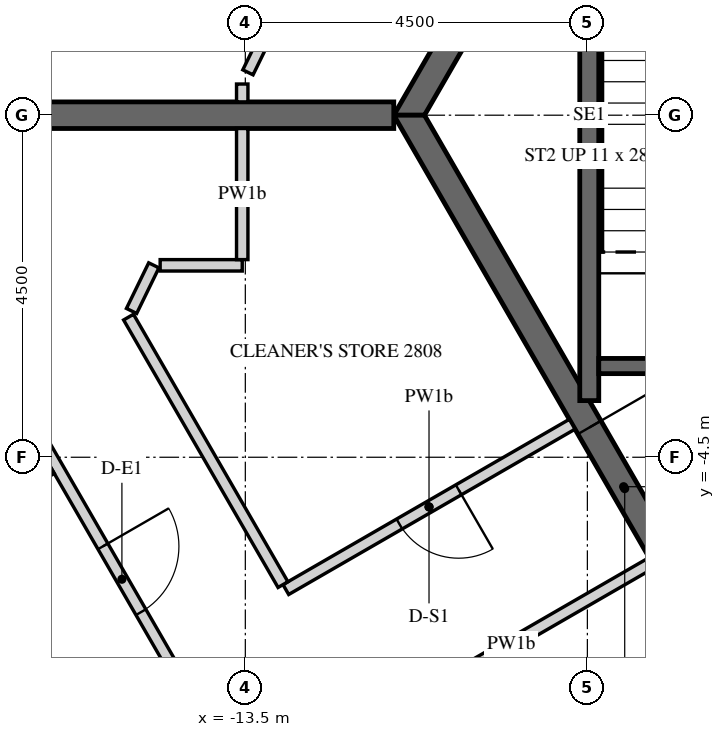
"""IFC4 building model, lengths in metres.
Left out: names, types, materials, properties, quantities, classifications, styles, units other than length and angle.
Written with IfcOpenShell. Run it as: python <this file> out.ifc"""

import sys

from ifc_helpers import new_model, si_unit, direction, frame, frame_2d, origin, place, context, subcontext, project, spatial, polyline, rectangle, outline, extrude, element, fill, save


model = new_model("IFC4")
c1 = context("Model", 3, precision=1e-05, world=origin(), true_north=direction((0.0, 1.0)))
c2 = subcontext(c1, "Body", "Model", "MODEL_VIEW")
j1 = project(units=[si_unit("LENGTHUNIT", "METRE"), si_unit("PLANEANGLEUNIT", "RADIAN")], contexts=[c1])
p1 = place(None, origin())
s1 = spatial("IfcSite", under=j1, at=p1, CompositionType="ELEMENT")
p2 = place(p1, origin())
s2 = spatial("IfcBuilding", under=s1, at=p2, CompositionType="ELEMENT")
p3 = place(p2, frame((0.0, 0.0, 361.2)))
s3 = spatial("IfcBuildingStorey", under=s2, at=p3, CompositionType="ELEMENT", Elevation=361.2)
p4 = place(p3, frame((-14.619, 19.699, -0.15), z_axis=(0.0, 0.0, 1.0), x_axis=(-0.438373747484, -0.898792777851, 0.0)))
e1 = element("IfcWall", 1, at=p4, inside=s3, PredefinedType="SOLIDWALL", context=c2, shape_type="SweptSolid", body=[
    extrude(outline(polyline([(0.225, -0.225), (20.506, -0.225), (20.957, 0.225), (-0.225, 0.225), (0.225, -0.225)])), origin(), (0.0, 0.0, 1.0), 3.9),
])
p5 = place(p4, frame((0.325, 0.0, 1.05)))
e2 = element("IfcOpeningElement", 2, at=p5, cuts=e1, PredefinedType="OPENING", context=c2, shape_type="SweptSolid", body=[
    extrude(rectangle(XDim=0.9, YDim=1.5, at=frame_2d((0.45, 0.75))), frame((0.0, 0.235, 0.0), z_axis=(0.0, -1.0, 0.0), x_axis=(1.0, 0.0, 0.0)), (0.0, 0.0, 1.0), 0.47),
])
p6 = place(p4, frame((1.525, 0.0, 0.15)))
e3 = element("IfcOpeningElement", 3, at=p6, cuts=e1, PredefinedType="OPENING", context=c2, shape_type="SweptSolid", body=[
    extrude(rectangle(XDim=1.2, YDim=2.4, at=frame_2d((0.6, 1.2))), frame((0.0, 0.235, 0.0), z_axis=(0.0, -1.0, 0.0), x_axis=(1.0, 0.0, 0.0)), (0.0, 0.0, 1.0), 0.47),
])
p7 = place(p4, frame((3.766, 0.0, 1.05)))
e4 = element("IfcOpeningElement", 4, at=p7, cuts=e1, PredefinedType="OPENING", context=c2, shape_type="SweptSolid", body=[
    extrude(rectangle(XDim=0.9, YDim=1.5, at=frame_2d((0.45, 0.75))), frame((0.0, 0.235, 0.0), z_axis=(0.0, -1.0, 0.0), x_axis=(1.0, 0.0, 0.0)), (0.0, 0.0, 1.0), 0.47),
])
p8 = place(p4, frame((4.966, 0.0, 0.15)))
e5 = element("IfcOpeningElement", 5, at=p8, cuts=e1, PredefinedType="OPENING", context=c2, shape_type="SweptSolid", body=[
    extrude(rectangle(XDim=1.2, YDim=2.4, at=frame_2d((0.6, 1.2))), frame((0.0, 0.235, 0.0), z_axis=(0.0, -1.0, 0.0), x_axis=(1.0, 0.0, 0.0)), (0.0, 0.0, 1.0), 0.47),
])
p9 = place(p4, frame((7.366, 0.0, 1.05)))
e6 = element("IfcOpeningElement", 6, at=p9, cuts=e1, PredefinedType="OPENING", context=c2, shape_type="SweptSolid", body=[
    extrude(rectangle(XDim=0.9, YDim=1.5, at=frame_2d((0.45, 0.75))), frame((0.0, 0.235, 0.0), z_axis=(0.0, -1.0, 0.0), x_axis=(1.0, 0.0, 0.0)), (0.0, 0.0, 1.0), 0.47),
])
p10 = place(p4, frame((8.566, 0.0, 0.15)))
e7 = element("IfcOpeningElement", 7, at=p10, cuts=e1, PredefinedType="OPENING", context=c2, shape_type="SweptSolid", body=[
    extrude(rectangle(XDim=1.2, YDim=2.4, at=frame_2d((0.6, 1.2))), frame((0.0, 0.235, 0.0), z_axis=(0.0, -1.0, 0.0), x_axis=(1.0, 0.0, 0.0)), (0.0, 0.0, 1.0), 0.47),
])
p11 = place(p4, frame((10.966, 0.0, 1.05)))
e8 = element("IfcOpeningElement", 8, at=p11, cuts=e1, PredefinedType="OPENING", context=c2, shape_type="SweptSolid", body=[
    extrude(rectangle(XDim=0.9, YDim=1.5, at=frame_2d((0.45, 0.75))), frame((0.0, 0.235, 0.0), z_axis=(0.0, -1.0, 0.0), x_axis=(1.0, 0.0, 0.0)), (0.0, 0.0, 1.0), 0.47),
])
p12 = place(p4, frame((12.166, 0.0, 0.15)))
e9 = element("IfcOpeningElement", 9, at=p12, cuts=e1, PredefinedType="OPENING", context=c2, shape_type="SweptSolid", body=[
    extrude(rectangle(XDim=1.2, YDim=2.4, at=frame_2d((0.6, 1.2))), frame((0.0, 0.235, 0.0), z_axis=(0.0, -1.0, 0.0), x_axis=(1.0, 0.0, 0.0)), (0.0, 0.0, 1.0), 0.47),
])
p13 = place(p4, frame((14.566, 0.0, 1.05)))
e10 = element("IfcOpeningElement", 10, at=p13, cuts=e1, PredefinedType="OPENING", context=c2, shape_type="SweptSolid", body=[
    extrude(rectangle(XDim=0.9, YDim=1.5, at=frame_2d((0.45, 0.75))), frame((0.0, 0.235, 0.0), z_axis=(0.0, -1.0, 0.0), x_axis=(1.0, 0.0, 0.0)), (0.0, 0.0, 1.0), 0.47),
])
p14 = place(p4, frame((15.766, 0.0, 0.15)))
e11 = element("IfcOpeningElement", 11, at=p14, cuts=e1, PredefinedType="OPENING", context=c2, shape_type="SweptSolid", body=[
    extrude(rectangle(XDim=1.2, YDim=2.4, at=frame_2d((0.6, 1.2))), frame((0.0, 0.235, 0.0), z_axis=(0.0, -1.0, 0.0), x_axis=(1.0, 0.0, 0.0)), (0.0, 0.0, 1.0), 0.47),
])
p15 = place(p4, frame((18.007, 0.0, 1.05)))
e12 = element("IfcOpeningElement", 12, at=p15, cuts=e1, PredefinedType="OPENING", context=c2, shape_type="SweptSolid", body=[
    extrude(rectangle(XDim=0.9, YDim=1.5, at=frame_2d((0.45, 0.75))), frame((0.0, 0.235, 0.0), z_axis=(0.0, -1.0, 0.0), x_axis=(1.0, 0.0, 0.0)), (0.0, 0.0, 1.0), 0.47),
])
p16 = place(p4, frame((19.207, 0.0, 0.15)))
e13 = element("IfcOpeningElement", 13, at=p16, cuts=e1, PredefinedType="OPENING", context=c2, shape_type="SweptSolid", body=[
    extrude(rectangle(XDim=1.2, YDim=2.4, at=frame_2d((0.6, 1.2))), frame((0.0, 0.235, 0.0), z_axis=(0.0, -1.0, 0.0), x_axis=(1.0, 0.0, 0.0)), (0.0, 0.0, 1.0), 0.47),
])
p17 = place(p3, frame((-25.907, -2.678, -0.15), z_axis=(0.0, 0.0, 1.0), x_axis=(0.499997453958, -0.866026873738, 0.0)))
e14 = element("IfcWall", 14, at=p17, inside=s3, PredefinedType="SOLIDWALL", context=c2, shape_type="SweptSolid", body=[
    extrude(outline(polyline([(-0.018, -0.225), (23.152, -0.225), (23.11, 0.225), (0.018, 0.225), (-0.018, -0.225)])), origin(), (0.0, 0.0, 1.0), 3.9),
])
p18 = place(p17, frame((1.366, 0.0, 0.45)))
e15 = element("IfcOpeningElement", 15, at=p18, cuts=e14, PredefinedType="OPENING", context=c2, shape_type="SweptSolid", body=[
    extrude(rectangle(XDim=2.4, YDim=3.0, at=frame_2d((1.2, 1.5))), frame((0.0, 0.235, 0.0), z_axis=(0.0, -1.0, 0.0), x_axis=(1.0, 0.0, 0.0)), (0.0, 0.0, 1.0), 0.47),
])
p19 = place(p17, frame((4.966, 0.0, 0.45)))
e16 = element("IfcOpeningElement", 16, at=p19, cuts=e14, PredefinedType="OPENING", context=c2, shape_type="SweptSolid", body=[
    extrude(rectangle(XDim=2.4, YDim=3.0, at=frame_2d((1.2, 1.5))), frame((0.0, 0.235, 0.0), z_axis=(0.0, -1.0, 0.0), x_axis=(1.0, 0.0, 0.0)), (0.0, 0.0, 1.0), 0.47),
])
p20 = place(p17, frame((8.566, 0.0, 0.45)))
e17 = element("IfcOpeningElement", 17, at=p20, cuts=e14, PredefinedType="OPENING", context=c2, shape_type="SweptSolid", body=[
    extrude(rectangle(XDim=2.4, YDim=3.0, at=frame_2d((1.2, 1.5))), frame((0.0, 0.235, 0.0), z_axis=(0.0, -1.0, 0.0), x_axis=(1.0, 0.0, 0.0)), (0.0, 0.0, 1.0), 0.47),
])
p21 = place(p17, frame((12.166, 0.0, 0.45)))
e18 = element("IfcOpeningElement", 18, at=p21, cuts=e14, PredefinedType="OPENING", context=c2, shape_type="SweptSolid", body=[
    extrude(rectangle(XDim=2.4, YDim=3.0, at=frame_2d((1.2, 1.5))), frame((0.0, 0.235, 0.0), z_axis=(0.0, -1.0, 0.0), x_axis=(1.0, 0.0, 0.0)), (0.0, 0.0, 1.0), 0.47),
])
p22 = place(p17, frame((15.766, 0.0, 0.45)))
e19 = element("IfcOpeningElement", 19, at=p22, cuts=e14, PredefinedType="OPENING", context=c2, shape_type="SweptSolid", body=[
    extrude(rectangle(XDim=2.4, YDim=3.0, at=frame_2d((1.2, 1.5))), frame((0.0, 0.235, 0.0), z_axis=(0.0, -1.0, 0.0), x_axis=(1.0, 0.0, 0.0)), (0.0, 0.0, 1.0), 0.47),
])
p23 = place(p17, frame((19.366, 0.0, 0.45)))
e20 = element("IfcOpeningElement", 20, at=p23, cuts=e14, PredefinedType="OPENING", context=c2, shape_type="SweptSolid", body=[
    extrude(rectangle(XDim=2.4, YDim=3.0, at=frame_2d((1.2, 1.5))), frame((0.0, 0.235, 0.0), z_axis=(0.0, -1.0, 0.0), x_axis=(1.0, 0.0, 0.0)), (0.0, 0.0, 1.0), 0.47),
])
p24 = place(p3, frame((-5.673, 9.825, -0.15), z_axis=(0.0, 0.0, 1.0), x_axis=(-0.499995046907, -0.866028263435, 0.0)))
e21 = element("IfcWall", 21, at=p24, inside=s3, PredefinedType="SHEAR", context=c2, shape_type="SweptSolid", body=[
    extrude(outline(polyline([(-0.101, -0.175), (11.446, -0.175), (11.244, 0.175), (0.101, 0.175), (-0.101, -0.175)])), origin(), (0.0, 0.0, 1.0), 3.9),
])
p25 = place(p24, frame((4.801, 0.0, 0.15)))
e22 = element("IfcOpeningElement", 22, at=p25, cuts=e21, PredefinedType="OPENING", context=c2, shape_type="SweptSolid", body=[
    extrude(rectangle(XDim=1.8, YDim=2.4, at=frame_2d((0.9, 1.2))), frame((0.0, 0.185, 0.0), z_axis=(0.0, -1.0, 0.0), x_axis=(1.0, 0.0, 0.0)), (0.0, 0.0, 1.0), 0.37),
])
p26 = place(p3, frame((-11.345, 0.0, -0.15), z_axis=(0.0, 0.0, 1.0), x_axis=(0.499995046907, -0.866028263435, 0.0)))
e23 = element("IfcWall", 23, at=p26, inside=s3, PredefinedType="SHEAR", context=c2, shape_type="SweptSolid", body=[
    extrude(outline(polyline([(-0.101, -0.175), (11.446, -0.175), (11.244, 0.175), (0.101, 0.175), (-0.101, -0.175)])), origin(), (0.0, 0.0, 1.0), 3.9),
])
p27 = place(p26, frame((4.744, 0.0, 0.15)))
e24 = element("IfcOpeningElement", 24, at=p27, cuts=e23, PredefinedType="OPENING", context=c2, shape_type="SweptSolid", body=[
    extrude(rectangle(XDim=1.8, YDim=2.4, at=frame_2d((0.9, 1.2))), frame((0.0, 0.185, 0.0), z_axis=(0.0, -1.0, 0.0), x_axis=(1.0, 0.0, 0.0)), (0.0, 0.0, 1.0), 0.37),
])
p28 = place(p3, frame((-11.547, 0.0, -0.15), z_axis=(0.0, 0.0, 1.0), x_axis=(-1.0, 0.0, 0.0)))
e25 = element("IfcWall", 25, at=p28, inside=s3, PredefinedType="SHEAR", context=c2, shape_type="SweptSolid", body=[
    extrude(rectangle(XDim=14.51, YDim=0.35, at=frame_2d((7.255, 0.0))), origin(), (0.0, 0.0, 1.0), 3.9),
])
p29 = place(p28, frame((6.355, 0.0, 0.15)))
e26 = element("IfcOpeningElement", 26, at=p29, cuts=e25, PredefinedType="OPENING", context=c2, shape_type="SweptSolid", body=[
    extrude(rectangle(XDim=1.8, YDim=2.4, at=frame_2d((0.9, 1.2))), frame((0.0, 0.185, 0.0), z_axis=(0.0, -1.0, 0.0), x_axis=(1.0, 0.0, 0.0)), (0.0, 0.0, 1.0), 0.37),
])
p30 = place(p3, frame((-8.975, -3.755, -0.25), z_axis=(0.0, 0.0, 1.0), x_axis=(0.0, 1.0, 0.0)))
e27 = element("IfcWall", 27, at=p30, inside=s3, PredefinedType="SHEAR", context=c2, shape_type="SweptSolid", body=[
    extrude(rectangle(XDim=7.51, YDim=0.25, at=frame_2d((3.755, 0.0))), origin(), (0.0, 0.0, 1.0), 3.9),
])
p31 = place(p3, frame((-8.85, -3.3, -0.25), z_axis=(0.0, 0.0, 1.0), x_axis=(1.0, 0.0, 0.0)))
e28 = element("IfcWall", 28, at=p31, inside=s3, PredefinedType="SHEAR", context=c2, shape_type="SweptSolid", body=[
    extrude(rectangle(XDim=2.95, YDim=0.2, at=frame_2d((1.475, 0.0))), origin(), (0.0, 0.0, 1.0), 3.9),
])
p32 = place(p31, frame((0.875, 0.0, 0.25)))
e29 = element("IfcOpeningElement", 29, at=p32, cuts=e28, PredefinedType="OPENING", context=c2, shape_type="SweptSolid", body=[
    extrude(rectangle(XDim=1.2, YDim=2.4, at=frame_2d((0.6, 1.2))), frame((0.0, 0.11, 0.0), z_axis=(0.0, -1.0, 0.0), x_axis=(1.0, 0.0, 0.0)), (0.0, 0.0, 1.0), 0.22),
])
p33 = place(p3, frame((-13.541, 0.175, 0.0), z_axis=(0.0, 0.0, 1.0), x_axis=(0.0, 1.0, 0.0)))
e30 = element("IfcWall", 30, at=p33, inside=s3, PredefinedType="PARTITIONING", context=c2, shape_type="SweptSolid", body=[
    extrude(rectangle(XDim=0.235, YDim=0.15, at=frame_2d((0.118, 0.0))), origin(), (0.0, 0.0, 1.0), 2.82),
])
p34 = place(p3, frame((-13.466, 0.564, 0.0), z_axis=(0.0, 0.0, 1.0), x_axis=(0.438366040624, 0.898796536724, 0.0)))
e31 = element("IfcWall", 31, at=p34, inside=s3, PredefinedType="PARTITIONING", context=c2, shape_type="SweptSolid", body=[
    extrude(rectangle(XDim=5.178, YDim=0.15, at=frame_2d((2.589, 0.0))), origin(), (0.0, 0.0, 1.0), 2.82),
])
p35 = place(p3, frame((-17.036, -2.792, 0.0), z_axis=(0.0, 0.0, 1.0), x_axis=(0.500006428338, -0.86602169235, 0.0)))
e32 = element("IfcWall", 32, at=p35, inside=s3, PredefinedType="PARTITIONING", context=c2, shape_type="SweptSolid", body=[
    extrude(rectangle(XDim=13.966, YDim=0.15, at=frame_2d((6.983, 0.0))), origin(), (0.0, 0.0, 1.0), 2.82),
])
p36 = place(p35, frame((3.325, 0.0, 0.0)))
e33 = element("IfcOpeningElement", 33, at=p36, cuts=e32, PredefinedType="OPENING", context=c2, shape_type="SweptSolid", body=[
    extrude(rectangle(XDim=1.0, YDim=2.1, at=frame_2d((0.5, 1.05))), frame((0.0, 0.085, 0.0), z_axis=(0.0, -1.0, 0.0), x_axis=(1.0, 0.0, 0.0)), (0.0, 0.0, 1.0), 0.17),
])
p37 = place(p3, frame((-9.2, -4.066, 0.0), z_axis=(0.0, 0.0, 1.0), x_axis=(-0.866013608182, -0.500020430026, 0.0)))
e34 = element("IfcWall", 34, at=p37, inside=s3, PredefinedType="PARTITIONING", context=c2, shape_type="SweptSolid", body=[
    extrude(rectangle(XDim=4.35, YDim=0.15, at=frame_2d((2.175, 0.0))), origin(), (0.0, 0.0, 1.0), 2.82),
])
p38 = place(p37, frame((1.725, 0.0, 0.0)))
e35 = element("IfcOpeningElement", 35, at=p38, cuts=e34, PredefinedType="OPENING", context=c2, shape_type="SweptSolid", body=[
    extrude(rectangle(XDim=0.9, YDim=2.1, at=frame_2d((0.45, 1.05))), frame((0.0, 0.085, 0.0), z_axis=(0.0, -1.0, 0.0), x_axis=(1.0, 0.0, 0.0)), (0.0, 0.0, 1.0), 0.17),
])
p39 = place(p3, frame((-13.004, -6.176, 0.0), z_axis=(0.0, 0.0, 1.0), x_axis=(-0.500022342669, 0.866012503854, 0.0)))
e36 = element("IfcWall", 36, at=p39, inside=s3, PredefinedType="PARTITIONING", context=c2, shape_type="SweptSolid", body=[
    extrude(rectangle(XDim=4.064, YDim=0.15, at=frame_2d((2.032, 0.0))), origin(), (0.0, 0.0, 1.0), 2.82),
])
p40 = place(p3, frame((-14.997, -2.575, 0.0), z_axis=(0.0, 0.0, 1.0), x_axis=(0.438416427913, 0.898771959808, 0.0)))
e37 = element("IfcWall", 37, at=p40, inside=s3, PredefinedType="PARTITIONING", context=c2, shape_type="SweptSolid", body=[
    extrude(rectangle(XDim=0.668, YDim=0.15, at=frame_2d((0.334, 0.0))), origin(), (0.0, 0.0, 1.0), 2.82),
])
p41 = place(p3, frame((-14.62, -1.975, 0.0), z_axis=(0.0, 0.0, 1.0), x_axis=(1.0, 0.0, 0.0)))
e38 = element("IfcWall", 38, at=p41, inside=s3, PredefinedType="PARTITIONING", context=c2, shape_type="SweptSolid", body=[
    extrude(rectangle(XDim=1.08, YDim=0.15, at=frame_2d((0.54, 0.0))), origin(), (0.0, 0.0, 1.0), 2.82),
])
p42 = place(p3, frame((-13.541, -1.9, 0.0), z_axis=(0.0, 0.0, 1.0), x_axis=(0.0, 1.0, 0.0)))
e39 = element("IfcWall", 39, at=p42, inside=s3, PredefinedType="PARTITIONING", context=c2, shape_type="SweptSolid", body=[
    extrude(rectangle(XDim=1.725, YDim=0.15, at=frame_2d((0.862, 0.0))), origin(), (0.0, 0.0, 1.0), 2.82),
])
p43 = place(p3, frame((-11.852, -8.022, 0.0), z_axis=(0.0, 0.0, 1.0), x_axis=(0.866038183914, 0.499977863513, 0.0)))
e40 = element("IfcWall", 40, at=p43, inside=s3, PredefinedType="PARTITIONING", context=c2, shape_type="SweptSolid", body=[
    extrude(rectangle(XDim=4.275, YDim=0.15, at=frame_2d((2.138, 0.0))), origin(), (0.0, 0.0, 1.0), 2.82),
])
p44 = place(p3, frame((-16.039, -4.67, 0.0), z_axis=(0.0, 0.0, 1.0), x_axis=(-0.86604270489, -0.499970032409, 0.0)))
e41 = element("IfcWall", 41, at=p44, inside=s3, PredefinedType="PARTITIONING", context=c2, shape_type="SweptSolid", body=[
    extrude(rectangle(XDim=4.325, YDim=0.1, at=frame_2d((2.163, 0.0))), origin(), (0.0, 0.0, 1.0), 2.82),
])
p45 = place(p44, frame((1.725, 0.0, 0.0)))
e42 = element("IfcOpeningElement", 42, at=p45, cuts=e41, PredefinedType="OPENING", context=c2, shape_type="SweptSolid", body=[
    extrude(rectangle(XDim=0.8, YDim=2.1, at=frame_2d((0.4, 1.05))), frame((0.0, 0.06, 0.0), z_axis=(0.0, -1.0, 0.0), x_axis=(1.0, 0.0, 0.0)), (0.0, 0.0, 1.0), 0.12),
])
p46 = place(p27, origin())
e43 = element("IfcDoor", 43, at=p46, inside=s3, OperationType="DOUBLE_DOOR_SINGLE_SWING", PredefinedType="DOOR", context=c2, shape_type="SweptSolid", body=[
    extrude(rectangle(XDim=1.8, YDim=2.4, at=frame_2d((0.9, 1.2))), frame((0.0, 0.025, 0.0), z_axis=(0.0, -1.0, 0.0), x_axis=(1.0, 0.0, 0.0)), (0.0, 0.0, 1.0), 0.05),
])
fill(e24, e43)
p47 = place(p36, origin())
e44 = element("IfcDoor", 44, at=p47, inside=s3, OperationType="SINGLE_SWING_RIGHT", PredefinedType="DOOR", context=c2, shape_type="SweptSolid", body=[
    extrude(rectangle(XDim=1.0, YDim=2.1, at=frame_2d((0.5, 1.05))), frame((0.0, 0.025, 0.0), z_axis=(0.0, -1.0, 0.0), x_axis=(1.0, 0.0, 0.0)), (0.0, 0.0, 1.0), 0.05),
])
fill(e33, e44)
p48 = place(p38, origin())
e45 = element("IfcDoor", 45, at=p48, inside=s3, OperationType="SINGLE_SWING_LEFT", PredefinedType="DOOR", context=c2, shape_type="SweptSolid", body=[
    extrude(rectangle(XDim=0.9, YDim=2.1, at=frame_2d((0.45, 1.05))), frame((0.0, 0.025, 0.0), z_axis=(0.0, -1.0, 0.0), x_axis=(1.0, 0.0, 0.0)), (0.0, 0.0, 1.0), 0.05),
])
fill(e35, e45)
save(model, sys.argv[1])
